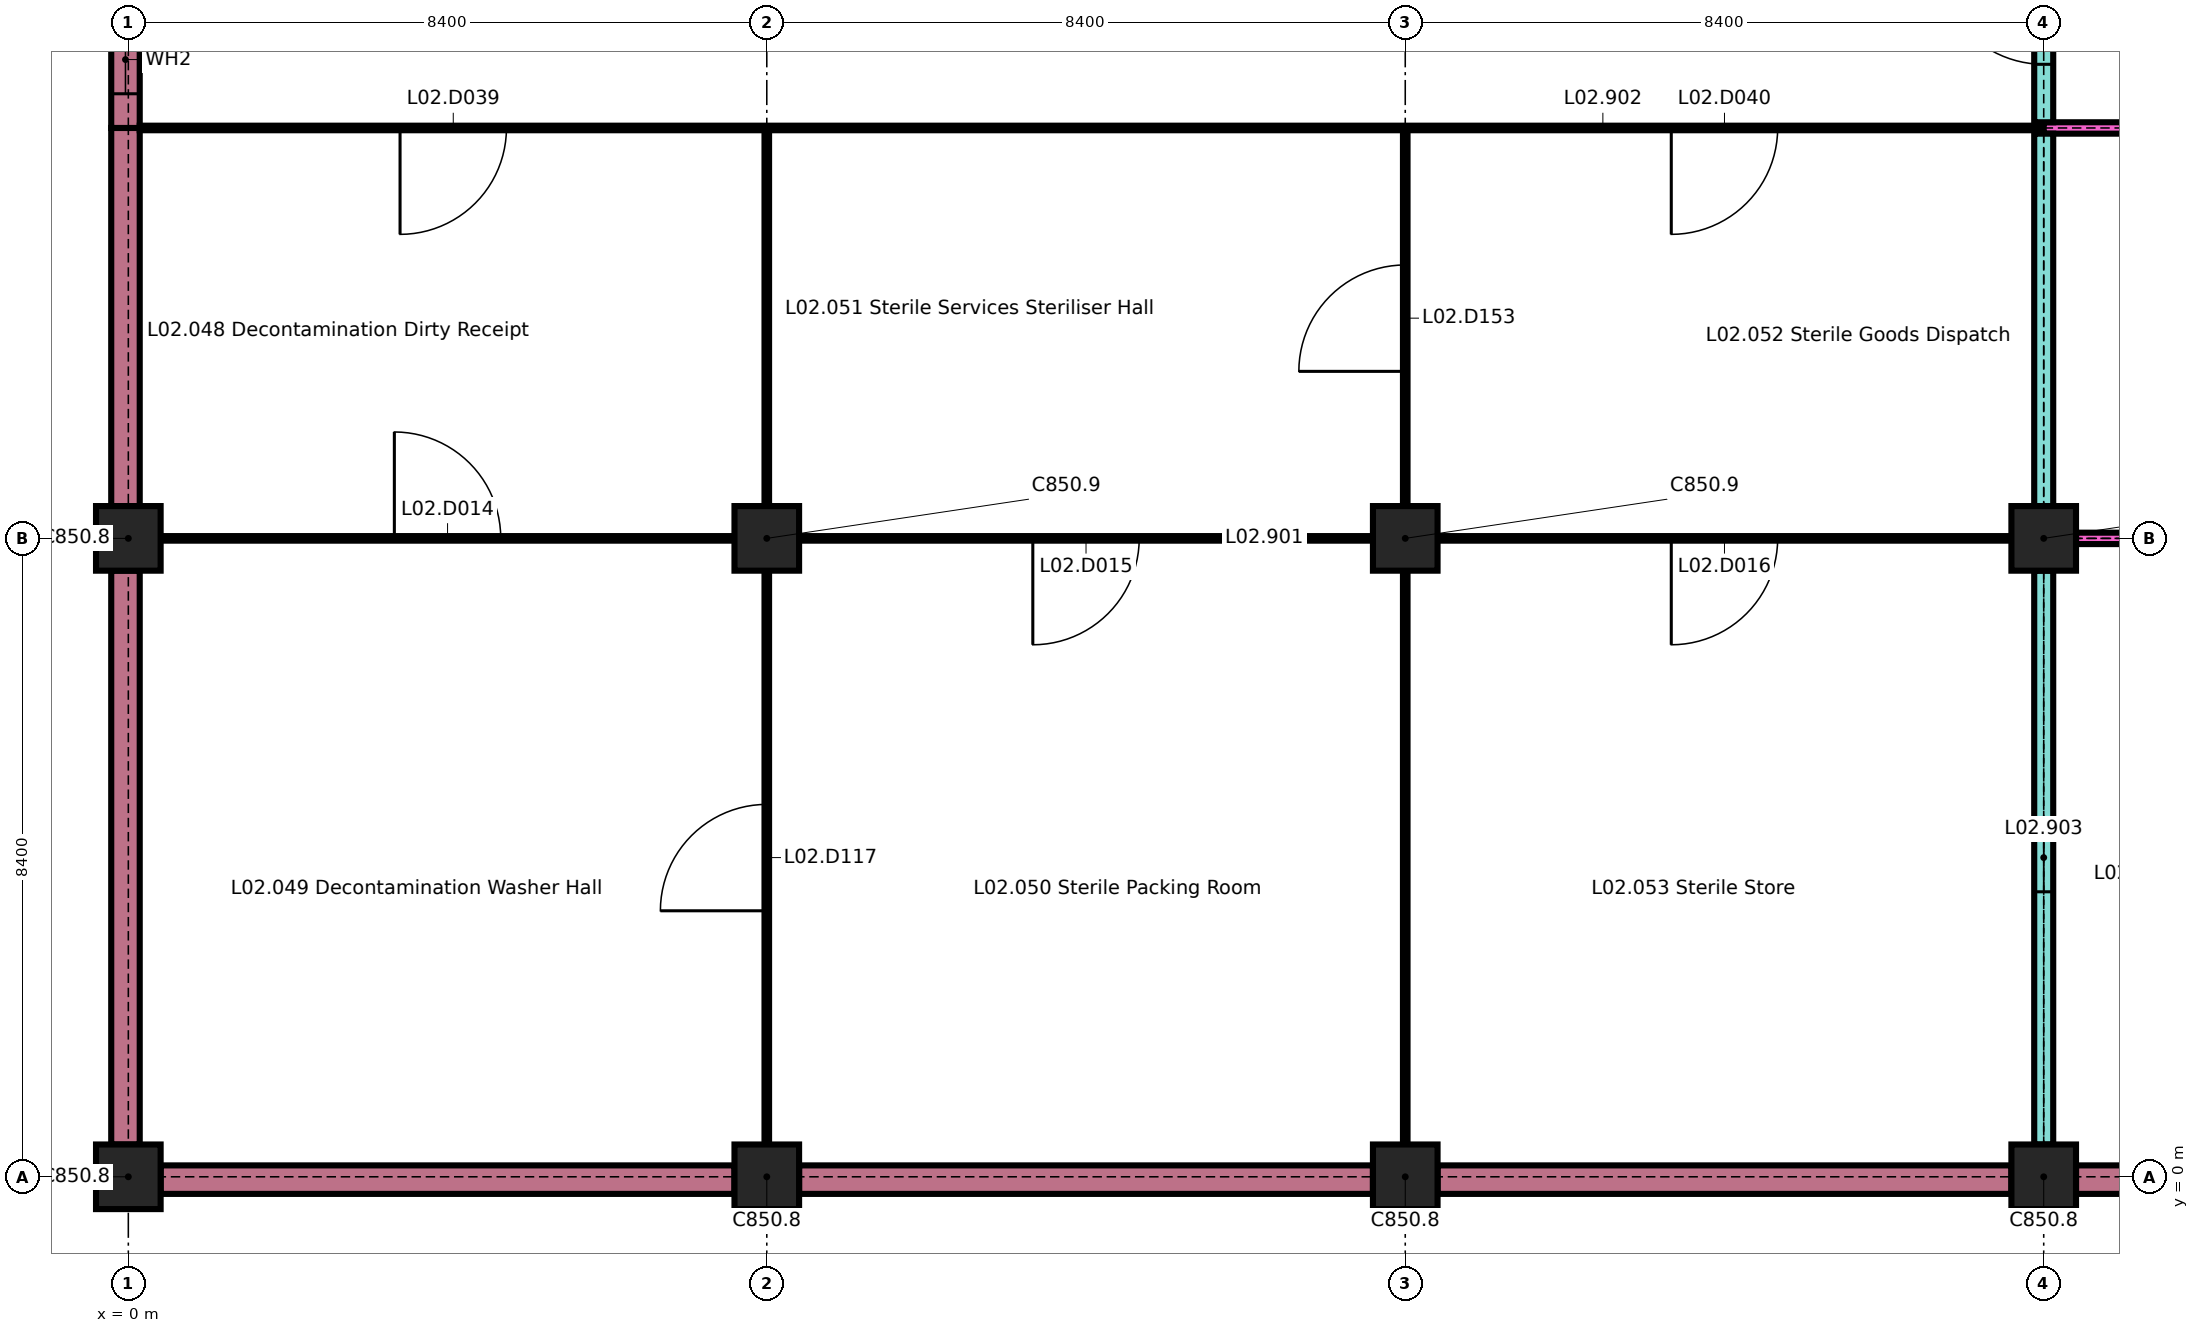
"""IFC4 building model, lengths in metres.
Left out: names, types, materials, properties, quantities, classifications, styles, units other than length and angle.
Written with IfcOpenShell. Run it as: python <this file> out.ifc"""

import sys

from ifc_helpers import new_model, si_unit, direction, frame, frame_2d, origin, origin_2d, place, context, subcontext, project, spatial, rectangle, extrude, element, fill, save


model = new_model("IFC4")
c1 = context("Model", 3, precision=1e-05, world=origin(), true_north=direction((0.0, 1.0)))
c2 = subcontext(c1, "Body", "Model", "MODEL_VIEW")
j1 = project(units=[si_unit("LENGTHUNIT", "METRE"), si_unit("PLANEANGLEUNIT", "RADIAN")], contexts=[c1])
p1 = place(None, origin())
s1 = spatial("IfcSite", under=j1, at=p1, CompositionType="ELEMENT")
p2 = place(p1, origin())
s2 = spatial("IfcBuilding", under=s1, at=p2, CompositionType="ELEMENT")
p3 = place(p2, frame((0.0, 0.0, 8.4)))
s3 = spatial("IfcBuildingStorey", under=s2, at=p3, CompositionType="ELEMENT", Elevation=8.4)
for number, where, z_axis, x_axis in (
    (1, (0.0, 0.0, 0.0), (0.0, 0.0, 1.0), (1.0, 0.0, 0.0)),
    (2, (8.4, 0.0, 0.0), (0.0, 0.0, 1.0), (1.0, 0.0, 0.0)),
    (3, (16.8, 0.0, 0.0), (0.0, 0.0, 1.0), (1.0, 0.0, 0.0)),
    (4, (25.2, 0.0, 0.0), (0.0, 0.0, 1.0), (1.0, 0.0, 0.0)),
    (5, (0.0, 8.4, 0.0), (0.0, 0.0, 1.0), (1.0, 0.0, 0.0)),
    (6, (8.4, 8.4, 0.0), (0.0, 0.0, 1.0), (1.0, 0.0, 0.0)),
    (7, (16.8, 8.4, 0.0), (0.0, 0.0, 1.0), (1.0, 0.0, 0.0)),
    (8, (25.2, 8.4, 0.0), (0.0, 0.0, 1.0), (1.0, 0.0, 0.0)),
):
    element("IfcColumn", number, at=place(p3, frame(where, z_axis=z_axis, x_axis=x_axis)), inside=s3, PredefinedType="COLUMN", context=c2, shape_type="SweptSolid", body=[
        extrude(rectangle(XDim=0.85, YDim=0.85, at=origin_2d()), origin(), (0.0, 0.0, 1.0), 4.2),
    ])
for number, where, z_axis, x_axis in (
    (9, (0.425, -0.038, 0.0), (0.0, 0.0, 1.0), (1.0, 0.0, 0.0)),
    (10, (8.825, -0.038, 0.0), (0.0, 0.0, 1.0), (1.0, 0.0, 0.0)),
):
    element("IfcWall", number, at=place(p3, frame(where, z_axis=z_axis, x_axis=x_axis)), inside=s3, PredefinedType="SOLIDWALL", context=c2, shape_type="SweptSolid", body=[
        extrude(rectangle(XDim=7.55, YDim=0.375, at=frame_2d((3.775, 0.0))), origin(), (0.0, 0.0, 1.0), 3.9),
    ])
p4 = place(p3, frame((17.225, -0.038, 0.0), z_axis=(0.0, 0.0, 1.0), x_axis=(1.0, 0.0, 0.0)))
e11 = element("IfcWall", 11, at=p4, inside=s3, PredefinedType="SOLIDWALL", context=c2, shape_type="SweptSolid", body=[
    extrude(rectangle(XDim=7.55, YDim=0.375, at=frame_2d((3.775, 0.0))), origin(), (0.0, 0.0, 1.0), 3.9),
])
p5 = place(p3, frame((25.625, -0.038, 0.0), z_axis=(0.0, 0.0, 1.0), x_axis=(1.0, 0.0, 0.0)))
e12 = element("IfcWall", 12, at=p5, inside=s3, PredefinedType="SOLIDWALL", context=c2, shape_type="SweptSolid", body=[
    extrude(rectangle(XDim=4.575, YDim=0.375, at=frame_2d((2.288, 0.0))), origin(), (0.0, 0.0, 1.0), 3.9),
])
p6 = place(p3, frame((-0.038, 0.425, 0.0), z_axis=(0.0, 0.0, 1.0), x_axis=(0.0, 1.0, 0.0)))
e13 = element("IfcWall", 13, at=p6, inside=s3, PredefinedType="SOLIDWALL", context=c2, shape_type="SweptSolid", body=[
    extrude(rectangle(XDim=7.55, YDim=0.375, at=frame_2d((3.775, 0.0))), origin(), (0.0, 0.0, 1.0), 3.9),
])
p7 = place(p3, frame((-0.038, 8.825, 0.0), z_axis=(0.0, 0.0, 1.0), x_axis=(0.0, 1.0, 0.0)))
e14 = element("IfcWall", 14, at=p7, inside=s3, PredefinedType="SOLIDWALL", context=c2, shape_type="SweptSolid", body=[
    extrude(rectangle(XDim=4.975, YDim=0.375, at=frame_2d((2.488, 0.0))), origin(), (0.0, 0.0, 1.0), 3.9),
])
p8 = place(p3, frame((-0.038, 13.8, 0.0), z_axis=(0.0, 0.0, 1.0), x_axis=(0.0, 1.0, 0.0)))
e15 = element("IfcWall", 15, at=p8, inside=s3, PredefinedType="SOLIDWALL", context=c2, shape_type="SweptSolid", body=[
    extrude(rectangle(XDim=3.0, YDim=0.375, at=frame_2d((1.5, 0.0))), origin(), (0.0, 0.0, 1.0), 3.9),
])
p9 = place(p8, frame((0.45, 0.0, 0.9)))
e16 = element("IfcOpeningElement", 16, at=p9, cuts=e15, PredefinedType="OPENING", context=c2, shape_type="SweptSolid", body=[
    extrude(rectangle(XDim=0.9, YDim=2.1, at=frame_2d((0.45, 1.05))), frame((0.0, 0.198, 0.0), z_axis=(0.0, -1.0, 0.0), x_axis=(1.0, 0.0, 0.0)), (0.0, 0.0, 1.0), 0.395),
])
p10 = place(p3, frame((0.425, 8.4, 0.0), z_axis=(0.0, 0.0, 1.0), x_axis=(1.0, 0.0, 0.0)))
e17 = element("IfcWall", 17, at=p10, inside=s3, PredefinedType="PARTITIONING", context=c2, shape_type="SweptSolid", body=[
    extrude(rectangle(XDim=7.55, YDim=0.06, at=frame_2d((3.775, 0.0))), origin(), (0.0, 0.0, 1.0), 4.2),
])
p11 = place(p10, frame((3.075, 0.0, 0.0)))
e18 = element("IfcOpeningElement", 18, at=p11, cuts=e17, PredefinedType="OPENING", context=c2, shape_type="SweptSolid", body=[
    extrude(rectangle(XDim=1.4, YDim=2.1, at=frame_2d((0.7, 1.05))), frame((0.0, 0.04, 0.0), z_axis=(0.0, -1.0, 0.0), x_axis=(1.0, 0.0, 0.0)), (0.0, 0.0, 1.0), 0.08),
])
p12 = place(p3, frame((8.825, 8.4, 0.0), z_axis=(0.0, 0.0, 1.0), x_axis=(1.0, 0.0, 0.0)))
e19 = element("IfcWall", 19, at=p12, inside=s3, PredefinedType="PARTITIONING", context=c2, shape_type="SweptSolid", body=[
    extrude(rectangle(XDim=7.55, YDim=0.06, at=frame_2d((3.775, 0.0))), origin(), (0.0, 0.0, 1.0), 4.2),
])
p13 = place(p12, frame((3.075, 0.0, 0.0)))
e20 = element("IfcOpeningElement", 20, at=p13, cuts=e19, PredefinedType="OPENING", context=c2, shape_type="SweptSolid", body=[
    extrude(rectangle(XDim=1.4, YDim=2.1, at=frame_2d((0.7, 1.05))), frame((0.0, 0.04, 0.0), z_axis=(0.0, -1.0, 0.0), x_axis=(1.0, 0.0, 0.0)), (0.0, 0.0, 1.0), 0.08),
])
p14 = place(p12, frame((4.775, 0.0, 0.9)))
e21 = element("IfcOpeningElement", 21, at=p14, cuts=e19, PredefinedType="OPENING", context=c2, shape_type="SweptSolid", body=[
    extrude(rectangle(XDim=1.2, YDim=0.9, at=frame_2d((0.6, 0.45))), frame((0.0, 0.04, 0.0), z_axis=(0.0, -1.0, 0.0), x_axis=(1.0, 0.0, 0.0)), (0.0, 0.0, 1.0), 0.08),
])
p15 = place(p3, frame((17.225, 8.4, 0.0), z_axis=(0.0, 0.0, 1.0), x_axis=(1.0, 0.0, 0.0)))
e22 = element("IfcWall", 22, at=p15, inside=s3, PredefinedType="PARTITIONING", context=c2, shape_type="SweptSolid", body=[
    extrude(rectangle(XDim=7.55, YDim=0.06, at=frame_2d((3.775, 0.0))), origin(), (0.0, 0.0, 1.0), 4.2),
])
p16 = place(p15, frame((3.075, 0.0, 0.0)))
e23 = element("IfcOpeningElement", 23, at=p16, cuts=e22, PredefinedType="OPENING", context=c2, shape_type="SweptSolid", body=[
    extrude(rectangle(XDim=1.4, YDim=2.1, at=frame_2d((0.7, 1.05))), frame((0.0, 0.04, 0.0), z_axis=(0.0, -1.0, 0.0), x_axis=(1.0, 0.0, 0.0)), (0.0, 0.0, 1.0), 0.08),
])
p17 = place(p3, frame((25.625, 8.4, 0.0), z_axis=(0.0, 0.0, 1.0), x_axis=(1.0, 0.0, 0.0)))
e24 = element("IfcWall", 24, at=p17, inside=s3, PredefinedType="PARTITIONING", context=c2, shape_type="SweptSolid", body=[
    extrude(rectangle(XDim=4.5, YDim=0.15, at=frame_2d((2.25, 0.0))), origin(), (0.0, 0.0, 1.0), 4.2),
])
p18 = place(p17, frame((1.35, 0.0, 0.0)))
e25 = element("IfcOpeningElement", 25, at=p18, cuts=e24, PredefinedType="OPENING", context=c2, shape_type="SweptSolid", body=[
    extrude(rectangle(XDim=1.8, YDim=2.4, at=frame_2d((0.9, 1.2))), frame((0.0, 0.085, 0.0), z_axis=(0.0, -1.0, 0.0), x_axis=(1.0, 0.0, 0.0)), (0.0, 0.0, 1.0), 0.17),
])
p19 = place(p3, frame((0.15, 13.8, 0.0), z_axis=(0.0, 0.0, 1.0), x_axis=(1.0, 0.0, 0.0)))
e26 = element("IfcWall", 26, at=p19, inside=s3, PredefinedType="PARTITIONING", context=c2, shape_type="SweptSolid", body=[
    extrude(rectangle(XDim=25.05, YDim=0.06, at=frame_2d((12.525, 0.0))), origin(), (0.0, 0.0, 1.0), 4.2),
])
p20 = place(p19, frame((3.425, 0.0, 0.0)))
e27 = element("IfcOpeningElement", 27, at=p20, cuts=e26, PredefinedType="OPENING", context=c2, shape_type="SweptSolid", body=[
    extrude(rectangle(XDim=1.4, YDim=2.1, at=frame_2d((0.7, 1.05))), frame((0.0, 0.04, 0.0), z_axis=(0.0, -1.0, 0.0), x_axis=(1.0, 0.0, 0.0)), (0.0, 0.0, 1.0), 0.08),
])
p21 = place(p19, frame((20.15, 0.0, 0.0)))
e28 = element("IfcOpeningElement", 28, at=p21, cuts=e26, PredefinedType="OPENING", context=c2, shape_type="SweptSolid", body=[
    extrude(rectangle(XDim=1.4, YDim=2.1, at=frame_2d((0.7, 1.05))), frame((0.0, 0.04, 0.0), z_axis=(0.0, -1.0, 0.0), x_axis=(1.0, 0.0, 0.0)), (0.0, 0.0, 1.0), 0.08),
])
p22 = place(p19, frame((18.65, 0.0, 0.9)))
e29 = element("IfcOpeningElement", 29, at=p22, cuts=e26, PredefinedType="OPENING", context=c2, shape_type="SweptSolid", body=[
    extrude(rectangle(XDim=1.2, YDim=0.9, at=frame_2d((0.6, 0.45))), frame((0.0, 0.04, 0.0), z_axis=(0.0, -1.0, 0.0), x_axis=(1.0, 0.0, 0.0)), (0.0, 0.0, 1.0), 0.08),
])
p23 = place(p3, frame((25.2, 13.8, 0.0), z_axis=(0.0, 0.0, 1.0), x_axis=(1.0, 0.0, 0.0)))
e30 = element("IfcWall", 30, at=p23, inside=s3, PredefinedType="PARTITIONING", context=c2, shape_type="SweptSolid", body=[
    extrude(rectangle(XDim=8.475, YDim=0.15, at=frame_2d((4.238, 0.0))), origin(), (0.0, 0.0, 1.0), 4.2),
])
p24 = place(p23, frame((1.5, 0.0, 0.0)))
e31 = element("IfcOpeningElement", 31, at=p24, cuts=e30, PredefinedType="OPENING", context=c2, shape_type="SweptSolid", body=[
    extrude(rectangle(XDim=2.0, YDim=2.4, at=frame_2d((1.0, 1.2))), frame((0.0, 0.085, 0.0), z_axis=(0.0, -1.0, 0.0), x_axis=(1.0, 0.0, 0.0)), (0.0, 0.0, 1.0), 0.17),
])
p25 = place(p23, frame((6.0, 0.0, 0.0)))
e32 = element("IfcOpeningElement", 32, at=p25, cuts=e30, PredefinedType="OPENING", context=c2, shape_type="SweptSolid", body=[
    extrude(rectangle(XDim=1.4, YDim=2.1, at=frame_2d((0.7, 1.05))), frame((0.0, 0.085, 0.0), z_axis=(0.0, -1.0, 0.0), x_axis=(1.0, 0.0, 0.0)), (0.0, 0.0, 1.0), 0.17),
])
p26 = place(p3, frame((8.4, 0.425, 0.0), z_axis=(0.0, 0.0, 1.0), x_axis=(0.0, 1.0, 0.0)))
e33 = element("IfcWall", 33, at=p26, inside=s3, PredefinedType="PARTITIONING", context=c2, shape_type="SweptSolid", body=[
    extrude(rectangle(XDim=7.55, YDim=0.06, at=frame_2d((3.775, 0.0))), origin(), (0.0, 0.0, 1.0), 4.2),
])
p27 = place(p26, frame((3.075, 0.0, 0.0)))
e34 = element("IfcOpeningElement", 34, at=p27, cuts=e33, PredefinedType="OPENING", context=c2, shape_type="SweptSolid", body=[
    extrude(rectangle(XDim=1.4, YDim=2.1, at=frame_2d((0.7, 1.05))), frame((0.0, 0.04, 0.0), z_axis=(0.0, -1.0, 0.0), x_axis=(1.0, 0.0, 0.0)), (0.0, 0.0, 1.0), 0.08),
])
p28 = place(p3, frame((8.4, 8.825, 0.0), z_axis=(0.0, 0.0, 1.0), x_axis=(0.0, 1.0, 0.0)))
e35 = element("IfcWall", 35, at=p28, inside=s3, PredefinedType="PARTITIONING", context=c2, shape_type="SweptSolid", body=[
    extrude(rectangle(XDim=4.945, YDim=0.06, at=frame_2d((2.473, 0.0))), origin(), (0.0, 0.0, 1.0), 4.2),
])
p29 = place(p3, frame((16.8, 0.425, 0.0), z_axis=(0.0, 0.0, 1.0), x_axis=(0.0, 1.0, 0.0)))
e36 = element("IfcWall", 36, at=p29, inside=s3, PredefinedType="PARTITIONING", context=c2, shape_type="SweptSolid", body=[
    extrude(rectangle(XDim=7.55, YDim=0.06, at=frame_2d((3.775, 0.0))), origin(), (0.0, 0.0, 1.0), 4.2),
])
p30 = place(p3, frame((16.8, 8.825, 0.0), z_axis=(0.0, 0.0, 1.0), x_axis=(0.0, 1.0, 0.0)))
e37 = element("IfcWall", 37, at=p30, inside=s3, PredefinedType="PARTITIONING", context=c2, shape_type="SweptSolid", body=[
    extrude(rectangle(XDim=4.945, YDim=0.06, at=frame_2d((2.473, 0.0))), origin(), (0.0, 0.0, 1.0), 4.2),
])
p31 = place(p30, frame((1.772, 0.0, 0.0)))
e38 = element("IfcOpeningElement", 38, at=p31, cuts=e37, PredefinedType="OPENING", context=c2, shape_type="SweptSolid", body=[
    extrude(rectangle(XDim=1.4, YDim=2.1, at=frame_2d((0.7, 1.05))), frame((0.0, 0.04, 0.0), z_axis=(0.0, -1.0, 0.0), x_axis=(1.0, 0.0, 0.0)), (0.0, 0.0, 1.0), 0.08),
])
p32 = place(p3, frame((25.2, 0.425, 0.0), z_axis=(0.0, 0.0, 1.0), x_axis=(0.0, 1.0, 0.0)))
e39 = element("IfcWall", 39, at=p32, inside=s3, PredefinedType="SOLIDWALL", context=c2, shape_type="SweptSolid", body=[
    extrude(rectangle(XDim=7.55, YDim=0.25, at=frame_2d((3.775, 0.0))), origin(), (0.0, 0.0, 1.0), 4.2),
])
p33 = place(p32, frame((3.325, 0.0, 0.9)))
e40 = element("IfcOpeningElement", 40, at=p33, cuts=e39, PredefinedType="OPENING", context=c2, shape_type="SweptSolid", body=[
    extrude(rectangle(XDim=0.9, YDim=0.6, at=frame_2d((0.45, 0.3))), frame((0.0, 0.135, 0.0), z_axis=(0.0, -1.0, 0.0), x_axis=(1.0, 0.0, 0.0)), (0.0, 0.0, 1.0), 0.27),
])
p34 = place(p3, frame((25.2, 8.825, 0.0), z_axis=(0.0, 0.0, 1.0), x_axis=(0.0, 1.0, 0.0)))
e41 = element("IfcWall", 41, at=p34, inside=s3, PredefinedType="SOLIDWALL", context=c2, shape_type="SweptSolid", body=[
    extrude(rectangle(XDim=4.9, YDim=0.25, at=frame_2d((2.45, 0.0))), origin(), (0.0, 0.0, 1.0), 4.2),
])
p35 = place(p3, frame((25.2, 13.875, 0.0), z_axis=(0.0, 0.0, 1.0), x_axis=(0.0, 1.0, 0.0)))
e42 = element("IfcWall", 42, at=p35, inside=s3, PredefinedType="SOLIDWALL", context=c2, shape_type="SweptSolid", body=[
    extrude(rectangle(XDim=7.725, YDim=0.25, at=frame_2d((3.863, 0.0))), origin(), (0.0, 0.0, 1.0), 4.2),
])
p36 = place(p35, frame((0.762, 0.0, 0.0)))
e43 = element("IfcOpeningElement", 43, at=p36, cuts=e42, PredefinedType="OPENING", context=c2, shape_type="SweptSolid", body=[
    extrude(rectangle(XDim=1.4, YDim=2.1, at=frame_2d((0.7, 1.05))), frame((0.0, 0.135, 0.0), z_axis=(0.0, -1.0, 0.0), x_axis=(1.0, 0.0, 0.0)), (0.0, 0.0, 1.0), 0.27),
])
p37 = place(p9, origin())
e44 = element("IfcWindow", 44, at=p37, inside=s3, PartitioningType="SINGLE_PANEL", PredefinedType="WINDOW", context=c2, shape_type="SweptSolid", body=[
    extrude(rectangle(XDim=0.9, YDim=2.1, at=frame_2d((0.45, 1.05))), frame((0.0, 0.03, 0.0), z_axis=(0.0, -1.0, 0.0), x_axis=(1.0, 0.0, 0.0)), (0.0, 0.0, 1.0), 0.06),
])
fill(e16, e44)
p38 = place(p11, origin())
e45 = element("IfcDoor", 45, at=p38, inside=s3, OperationType="SINGLE_SWING_RIGHT", PredefinedType="DOOR", context=c2, shape_type="SweptSolid", body=[
    extrude(rectangle(XDim=1.4, YDim=2.1, at=frame_2d((0.7, 1.05))), frame((0.0, 0.025, 0.0), z_axis=(0.0, -1.0, 0.0), x_axis=(1.0, 0.0, 0.0)), (0.0, 0.0, 1.0), 0.05),
])
fill(e18, e45)
p39 = place(p13, origin())
e46 = element("IfcDoor", 46, at=p39, inside=s3, OperationType="SINGLE_SWING_LEFT", PredefinedType="DOOR", context=c2, shape_type="SweptSolid", body=[
    extrude(rectangle(XDim=1.4, YDim=2.1, at=frame_2d((0.7, 1.05))), frame((0.0, 0.025, 0.0), z_axis=(0.0, -1.0, 0.0), x_axis=(1.0, 0.0, 0.0)), (0.0, 0.0, 1.0), 0.05),
])
fill(e20, e46)
p40 = place(p16, origin())
e47 = element("IfcDoor", 47, at=p40, inside=s3, OperationType="SINGLE_SWING_LEFT", PredefinedType="DOOR", context=c2, shape_type="SweptSolid", body=[
    extrude(rectangle(XDim=1.4, YDim=2.1, at=frame_2d((0.7, 1.05))), frame((0.0, 0.025, 0.0), z_axis=(0.0, -1.0, 0.0), x_axis=(1.0, 0.0, 0.0)), (0.0, 0.0, 1.0), 0.05),
])
fill(e23, e47)
p41 = place(p20, origin())
e48 = element("IfcDoor", 48, at=p41, inside=s3, OperationType="SINGLE_SWING_LEFT", PredefinedType="DOOR", context=c2, shape_type="SweptSolid", body=[
    extrude(rectangle(XDim=1.4, YDim=2.1, at=frame_2d((0.7, 1.05))), frame((0.0, 0.025, 0.0), z_axis=(0.0, -1.0, 0.0), x_axis=(1.0, 0.0, 0.0)), (0.0, 0.0, 1.0), 0.05),
])
fill(e27, e48)
p42 = place(p21, origin())
e49 = element("IfcDoor", 49, at=p42, inside=s3, OperationType="SINGLE_SWING_LEFT", PredefinedType="DOOR", context=c2, shape_type="SweptSolid", body=[
    extrude(rectangle(XDim=1.4, YDim=2.1, at=frame_2d((0.7, 1.05))), frame((0.0, 0.025, 0.0), z_axis=(0.0, -1.0, 0.0), x_axis=(1.0, 0.0, 0.0)), (0.0, 0.0, 1.0), 0.05),
])
fill(e28, e49)
p43 = place(p27, origin())
e50 = element("IfcDoor", 50, at=p43, inside=s3, OperationType="SINGLE_SWING_RIGHT", PredefinedType="DOOR", context=c2, shape_type="SweptSolid", body=[
    extrude(rectangle(XDim=1.4, YDim=2.1, at=frame_2d((0.7, 1.05))), frame((0.0, 0.025, 0.0), z_axis=(0.0, -1.0, 0.0), x_axis=(1.0, 0.0, 0.0)), (0.0, 0.0, 1.0), 0.05),
])
fill(e34, e50)
p44 = place(p31, origin())
e51 = element("IfcDoor", 51, at=p44, inside=s3, OperationType="SINGLE_SWING_RIGHT", PredefinedType="DOOR", context=c2, shape_type="SweptSolid", body=[
    extrude(rectangle(XDim=1.4, YDim=2.1, at=frame_2d((0.7, 1.05))), frame((0.0, 0.025, 0.0), z_axis=(0.0, -1.0, 0.0), x_axis=(1.0, 0.0, 0.0)), (0.0, 0.0, 1.0), 0.05),
])
fill(e38, e51)
p45 = place(p36, origin())
e52 = element("IfcDoor", 52, at=p45, inside=s3, OperationType="SINGLE_SWING_LEFT", PredefinedType="DOOR", context=c2, shape_type="SweptSolid", body=[
    extrude(rectangle(XDim=1.4, YDim=2.1, at=frame_2d((0.7, 1.05))), frame((0.0, 0.03, 0.0), z_axis=(0.0, -1.0, 0.0), x_axis=(1.0, 0.0, 0.0)), (0.0, 0.0, 1.0), 0.06),
])
fill(e43, e52)
p46 = place(p14, origin())
e53 = element("IfcWindow", 53, at=p46, inside=s3, PartitioningType="DOUBLE_PANEL_VERTICAL", PredefinedType="WINDOW", context=c2, shape_type="SweptSolid", body=[
    extrude(rectangle(XDim=1.2, YDim=0.9, at=frame_2d((0.6, 0.45))), frame((0.0, 0.03, 0.0), z_axis=(0.0, -1.0, 0.0), x_axis=(1.0, 0.0, 0.0)), (0.0, 0.0, 1.0), 0.06),
])
fill(e21, e53)
p47 = place(p22, origin())
e54 = element("IfcWindow", 54, at=p47, inside=s3, PartitioningType="DOUBLE_PANEL_VERTICAL", PredefinedType="WINDOW", context=c2, shape_type="SweptSolid", body=[
    extrude(rectangle(XDim=1.2, YDim=0.9, at=frame_2d((0.6, 0.45))), frame((0.0, 0.03, 0.0), z_axis=(0.0, -1.0, 0.0), x_axis=(1.0, 0.0, 0.0)), (0.0, 0.0, 1.0), 0.06),
])
fill(e29, e54)
p48 = place(p33, origin())
e55 = element("IfcWindow", 55, at=p48, inside=s3, PartitioningType="DOUBLE_PANEL_HORIZONTAL", PredefinedType="WINDOW", context=c2, shape_type="SweptSolid", body=[
    extrude(rectangle(XDim=0.9, YDim=0.6, at=frame_2d((0.45, 0.3))), frame((0.0, 0.03, 0.0), z_axis=(0.0, -1.0, 0.0), x_axis=(1.0, 0.0, 0.0)), (0.0, 0.0, 1.0), 0.06),
])
fill(e40, e55)
save(model, sys.argv[1])
